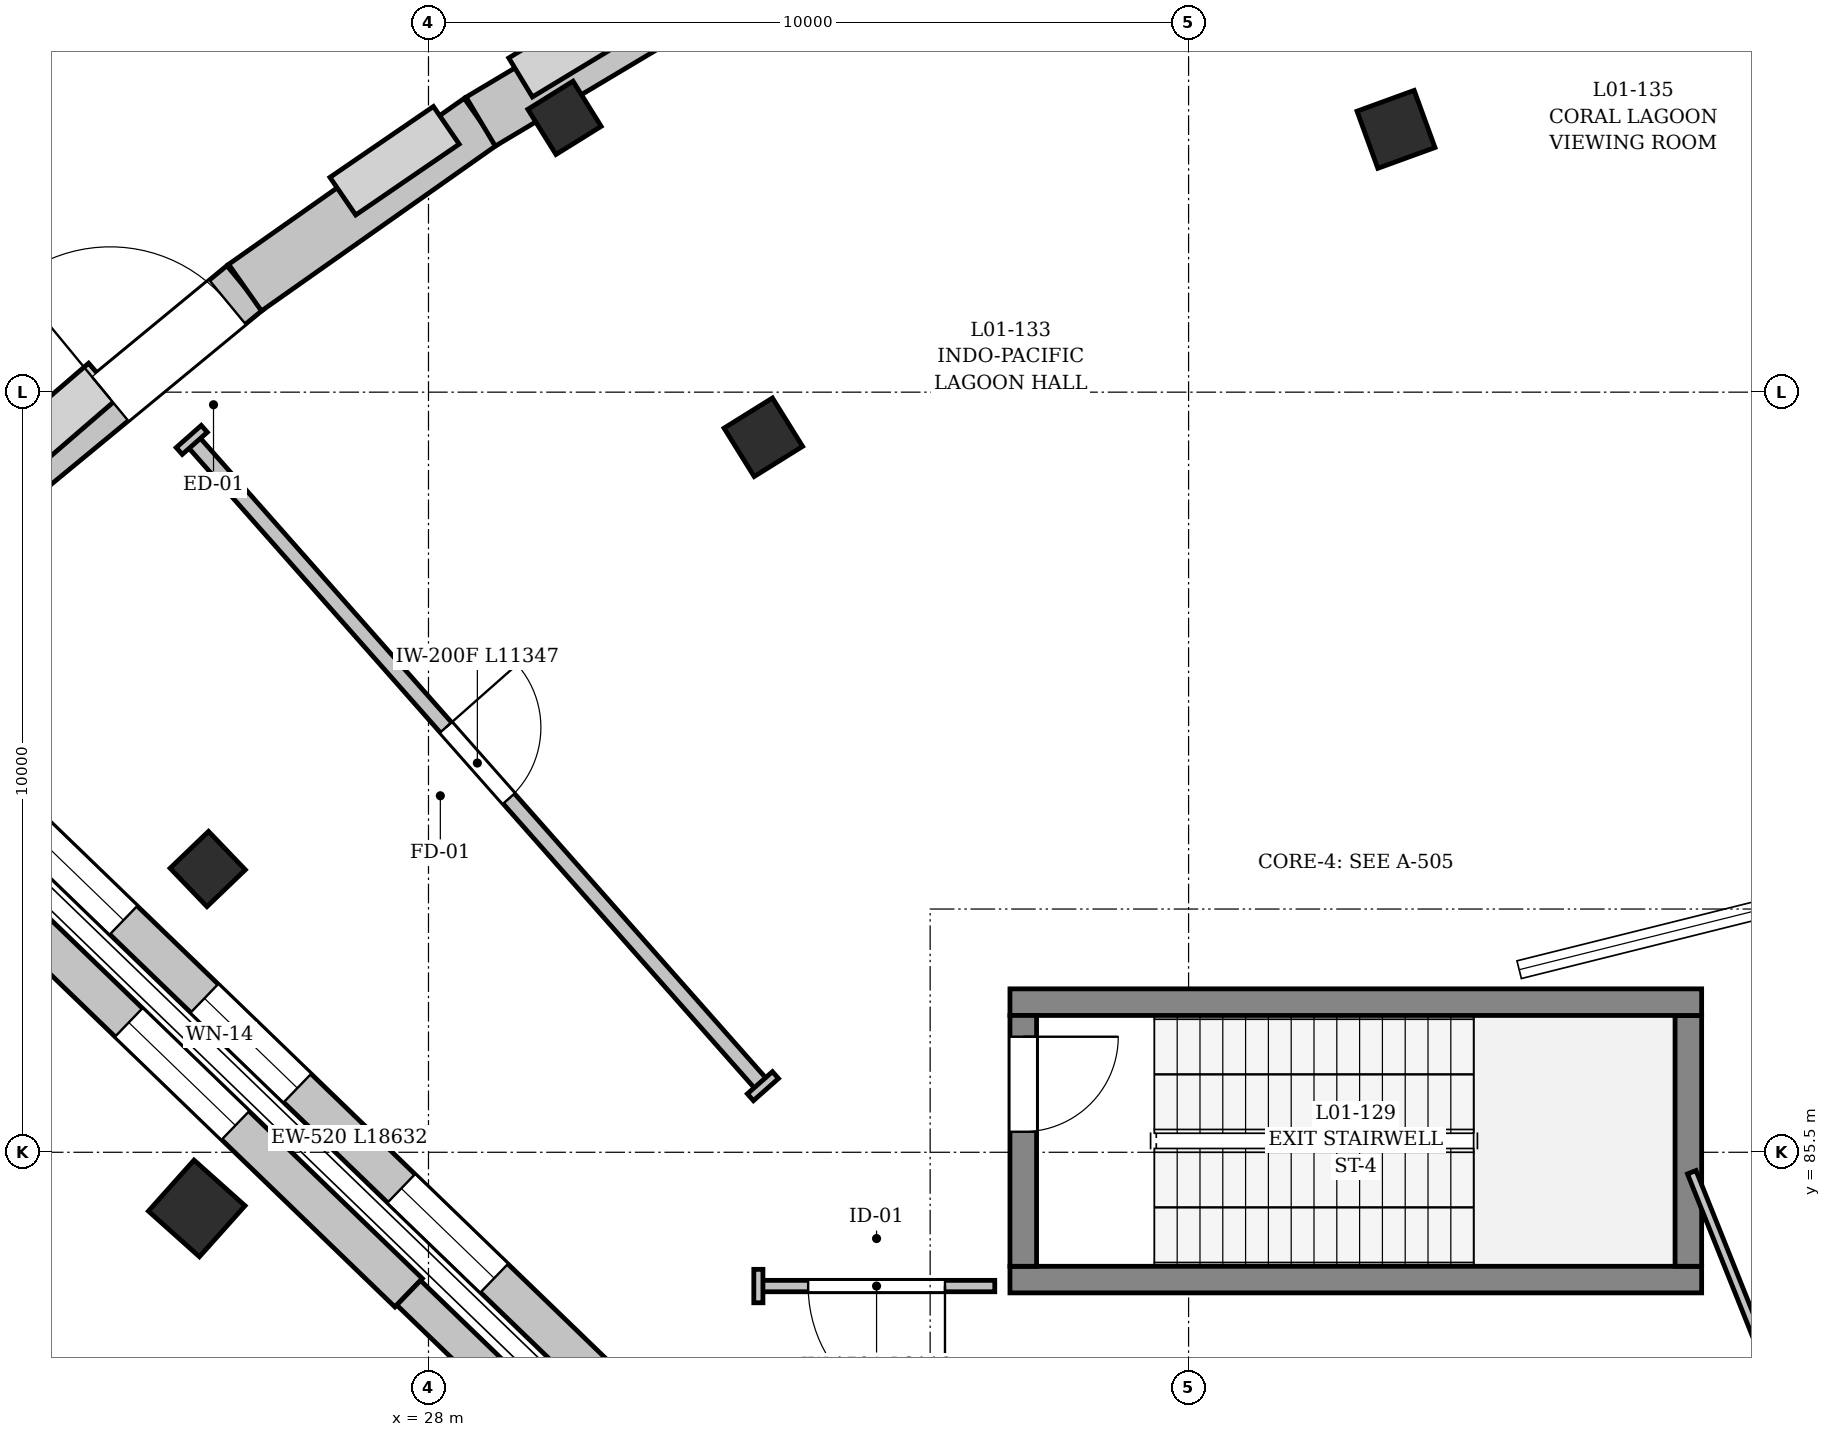
"""IFC4 building model, lengths in metres.
Left out: names, types, materials, properties, quantities, classifications, styles, units other than length and angle.
Written with IfcOpenShell. Run it as: python <this file> out.ifc"""

import sys

from ifc_helpers import new_model, si_unit, direction, frame, frame_2d, origin, origin_2d, place, context, subcontext, project, spatial, rectangle, extrude, element, fill, save


model = new_model("IFC4")
c1 = context("Model", 3, precision=1e-05, world=origin(), true_north=direction((0.0, 1.0)))
c2 = subcontext(c1, "Body", "Model", "MODEL_VIEW")
j1 = project(units=[si_unit("LENGTHUNIT", "METRE"), si_unit("PLANEANGLEUNIT", "RADIAN")], contexts=[c1])
p1 = place(None, origin())
s1 = spatial("IfcSite", under=j1, at=p1, CompositionType="ELEMENT")
p2 = place(p1, origin())
s2 = spatial("IfcBuilding", under=s1, at=p2, CompositionType="ELEMENT")
p3 = place(p2, origin())
s3 = spatial("IfcBuildingStorey", under=s2, at=p3, CompositionType="ELEMENT", Elevation=0.0)
p4 = place(p3, frame((24.951, 84.761, 0.0), z_axis=(0.0, 0.0, 1.0), x_axis=(-0.745475999683, 0.666532470249, 0.0)))
e1 = element("IfcColumn", 1, at=p4, inside=s3, PredefinedType="COLUMN", context=c2, shape_type="SweptSolid", body=[
    extrude(rectangle(XDim=0.9, YDim=0.9, at=origin_2d()), origin(), (0.0, 0.0, 1.0), 5.1),
])
p5 = place(p3, frame((40.729, 98.957, 0.0), z_axis=(0.0, 0.0, 1.0), x_axis=(-0.342020143326, 0.939692620786, 0.0)))
e2 = element("IfcColumn", 2, at=p5, inside=s3, PredefinedType="COLUMN", context=c2, shape_type="SweptSolid", body=[
    extrude(rectangle(XDim=0.8, YDim=0.8, at=origin_2d()), origin(), (0.0, 0.0, 1.0), 5.1),
])
p6 = place(p3, frame((32.405, 94.906, 0.0), z_axis=(0.0, 0.0, 1.0), x_axis=(-0.528438334722, 0.848971687629, 0.0)))
e3 = element("IfcColumn", 3, at=p6, inside=s3, PredefinedType="COLUMN", context=c2, shape_type="SweptSolid", body=[
    extrude(rectangle(XDim=0.75, YDim=0.75, at=origin_2d()), origin(), (0.0, 0.0, 1.0), 5.1),
])
for number, where, z_axis, x_axis in (
    (4, (29.79, 99.109, 0.0), (0.0, 0.0, 1.0), (-0.528, 0.849, 0.0)),
    (5, (25.096, 89.227, 0.0), (0.0, 0.0, 1.0), (-0.692, 0.722, 0.0)),
):
    element("IfcColumn", number, at=place(p3, frame(where, z_axis=z_axis, x_axis=x_axis)), inside=s3, PredefinedType="COLUMN", context=c2, shape_type="SweptSolid", body=[
        extrude(rectangle(XDim=0.7, YDim=0.7, at=origin_2d()), origin(), (0.0, 0.0, 1.0), 5.1),
    ])
p7 = place(p3, frame((21.777, 89.409, 0.0), z_axis=(0.0, 0.0, 1.0), x_axis=(0.719341564929, -0.694656543168, 0.0)))
e6 = element("IfcWall", 6, at=p7, inside=s3, PredefinedType="SOLIDWALL", context=c2, shape_type="SweptSolid", body=[
    extrude(rectangle(XDim=8.288, YDim=0.52, at=frame_2d((4.144, 0.0))), origin(), (0.0, 0.0, 1.0), 5.1),
])
p8 = place(p7, frame((3.169, 0.0, 0.9)))
e7 = element("IfcOpeningElement", 7, at=p8, cuts=e6, PredefinedType="OPENING", context=c2, shape_type="SweptSolid", body=[
    extrude(rectangle(XDim=1.95, YDim=2.0, at=frame_2d((0.975, 1.0))), frame((0.0, 0.27, 0.0), z_axis=(0.0, -1.0, 0.0), x_axis=(1.0, 0.0, 0.0)), (0.0, 0.0, 1.0), 0.54),
])
p9 = place(p3, frame((27.739, 83.652, 0.0), z_axis=(0.0, 0.0, 1.0), x_axis=(0.719337111916, -0.694661154392, 0.0)))
e8 = element("IfcWall", 8, at=p9, inside=s3, PredefinedType="SOLIDWALL", context=c2, shape_type="SweptSolid", body=[
    extrude(rectangle(XDim=10.003, YDim=0.45, at=frame_2d((5.001, 0.0))), origin(), (0.0, 0.0, 1.0), 5.1),
])
p10 = place(p9, frame((1.802, 0.0, 0.9)))
e9 = element("IfcOpeningElement", 9, at=p10, cuts=e8, PredefinedType="OPENING", context=c2, shape_type="SweptSolid", body=[
    extrude(rectangle(XDim=2.4, YDim=1.1, at=frame_2d((1.2, 0.55))), frame((0.0, 0.235, 0.0), z_axis=(0.0, -1.0, 0.0), x_axis=(1.0, 0.0, 0.0)), (0.0, 0.0, 1.0), 0.47),
])
p11 = place(p9, frame((5.802, 0.0, 0.9)))
e10 = element("IfcOpeningElement", 10, at=p11, cuts=e8, PredefinedType="OPENING", context=c2, shape_type="SweptSolid", body=[
    extrude(rectangle(XDim=2.4, YDim=1.1, at=frame_2d((1.2, 0.55))), frame((0.0, 0.235, 0.0), z_axis=(0.0, -1.0, 0.0), x_axis=(1.0, 0.0, 0.0)), (0.0, 0.0, 1.0), 0.47),
])
p12 = place(p3, frame((33.66, 79.213, 0.0), z_axis=(0.0, 0.0, 1.0), x_axis=(-0.719335980864, 0.694662325619, 0.0)))
e11 = element("IfcWall", 11, at=p12, inside=s3, PredefinedType="SOLIDWALL", context=c2, shape_type="SweptSolid", body=[
    extrude(rectangle(XDim=18.632, YDim=0.52, at=frame_2d((9.316, 0.0))), origin(), (0.0, 0.0, 1.0), 5.1),
])
p13 = place(p12, frame((3.066, 0.0, 0.9)))
e12 = element("IfcOpeningElement", 12, at=p13, cuts=e11, PredefinedType="OPENING", context=c2, shape_type="SweptSolid", body=[
    extrude(rectangle(XDim=1.7, YDim=1.55, at=frame_2d((0.85, 0.775))), frame((0.0, 0.27, 0.0), z_axis=(0.0, -1.0, 0.0), x_axis=(1.0, 0.0, 0.0)), (0.0, 0.0, 1.0), 0.54),
])
p14 = place(p12, frame((6.666, 0.0, 0.9)))
e13 = element("IfcOpeningElement", 13, at=p14, cuts=e11, PredefinedType="OPENING", context=c2, shape_type="SweptSolid", body=[
    extrude(rectangle(XDim=1.7, YDim=1.55, at=frame_2d((0.85, 0.775))), frame((0.0, 0.27, 0.0), z_axis=(0.0, -1.0, 0.0), x_axis=(1.0, 0.0, 0.0)), (0.0, 0.0, 1.0), 0.54),
])
p15 = place(p12, frame((10.266, 0.0, 0.9)))
e14 = element("IfcOpeningElement", 14, at=p15, cuts=e11, PredefinedType="OPENING", context=c2, shape_type="SweptSolid", body=[
    extrude(rectangle(XDim=1.7, YDim=1.55, at=frame_2d((0.85, 0.775))), frame((0.0, 0.27, 0.0), z_axis=(0.0, -1.0, 0.0), x_axis=(1.0, 0.0, 0.0)), (0.0, 0.0, 1.0), 0.54),
])
p16 = place(p12, frame((13.446, 0.0, 0.9)))
e15 = element("IfcOpeningElement", 15, at=p16, cuts=e11, PredefinedType="OPENING", context=c2, shape_type="SweptSolid", body=[
    extrude(rectangle(XDim=1.7, YDim=1.55, at=frame_2d((0.85, 0.775))), frame((0.0, 0.27, 0.0), z_axis=(0.0, -1.0, 0.0), x_axis=(1.0, 0.0, 0.0)), (0.0, 0.0, 1.0), 0.54),
])
p17 = place(p3, frame((22.661, 94.463, 0.0), z_axis=(0.0, 0.0, 1.0), x_axis=(0.771645805476, 0.636052474951, 0.0)))
e16 = element("IfcWall", 16, at=p17, inside=s3, PredefinedType="SOLIDWALL", context=c2, shape_type="SweptSolid", body=[
    extrude(rectangle(XDim=3.792, YDim=0.75, at=frame_2d((1.896, 0.0))), origin(), (0.0, 0.0, 1.0), 5.1),
])
p18 = place(p17, frame((1.492, 0.0, 0.0)))
e17 = element("IfcOpeningElement", 17, at=p18, cuts=e16, PredefinedType="OPENING", context=c2, shape_type="SweptSolid", body=[
    extrude(rectangle(XDim=2.0, YDim=2.5, at=frame_2d((1.0, 1.25))), frame((0.0, 0.385, 0.0), z_axis=(0.0, -1.0, 0.0), x_axis=(1.0, 0.0, 0.0)), (0.0, 0.0, 1.0), 0.77),
])
p19 = place(p3, frame((25.587, 96.875, 0.0), z_axis=(0.0, 0.0, 1.0), x_axis=(0.817470720904, 0.57597015588, 0.0)))
e18 = element("IfcWall", 18, at=p19, inside=s3, PredefinedType="SOLIDWALL", context=c2, shape_type="SweptSolid", body=[
    extrude(rectangle(XDim=3.792, YDim=0.75, at=frame_2d((1.896, 0.0))), origin(), (0.0, 0.0, 1.0), 5.1),
])
p20 = place(p3, frame((28.687, 99.059, 0.0), z_axis=(0.0, 0.0, 1.0), x_axis=(0.858644028079, 0.512572368592, 0.0)))
e19 = element("IfcWall", 19, at=p20, inside=s3, PredefinedType="SOLIDWALL", context=c2, shape_type="SweptSolid", body=[
    extrude(rectangle(XDim=3.792, YDim=0.75, at=frame_2d((1.896, 0.0))), origin(), (0.0, 0.0, 1.0), 4.09),
])
p21 = place(p3, frame((35.65, 83.825, 0.0), z_axis=(0.0, 0.0, 1.0), x_axis=(1.0, 0.0, 0.0)))
e20 = element("IfcWall", 20, at=p21, inside=s3, PredefinedType="SHEAR", context=c2, shape_type="SweptSolid", body=[
    extrude(rectangle(XDim=9.1, YDim=0.35, at=frame_2d((4.55, 0.0))), origin(), (0.0, 0.0, 1.0), 5.1),
])
p22 = place(p3, frame((44.575, 84.0, 0.0), z_axis=(0.0, 0.0, 1.0), x_axis=(0.0, 1.0, 0.0)))
e21 = element("IfcWall", 21, at=p22, inside=s3, PredefinedType="SHEAR", context=c2, shape_type="SweptSolid", body=[
    extrude(rectangle(XDim=3.3, YDim=0.35, at=frame_2d((1.65, 0.0))), origin(), (0.0, 0.0, 1.0), 5.1),
])
p23 = place(p3, frame((44.75, 87.475, 0.0), z_axis=(0.0, 0.0, 1.0), x_axis=(-1.0, 0.0, 0.0)))
e22 = element("IfcWall", 22, at=p23, inside=s3, PredefinedType="SHEAR", context=c2, shape_type="SweptSolid", body=[
    extrude(rectangle(XDim=9.1, YDim=0.35, at=frame_2d((4.55, 0.0))), origin(), (0.0, 0.0, 1.0), 5.1),
])
p24 = place(p3, frame((35.825, 87.3, 0.0), z_axis=(0.0, 0.0, 1.0), x_axis=(0.0, -1.0, 0.0)))
e23 = element("IfcWall", 23, at=p24, inside=s3, PredefinedType="SHEAR", context=c2, shape_type="SweptSolid", body=[
    extrude(rectangle(XDim=3.3, YDim=0.35, at=frame_2d((1.65, 0.0))), origin(), (0.0, 0.0, 1.0), 5.1),
])
p25 = place(p24, frame((0.28, 0.0, 0.0)))
e24 = element("IfcOpeningElement", 24, at=p25, cuts=e23, PredefinedType="OPENING", context=c2, shape_type="SweptSolid", body=[
    extrude(rectangle(XDim=1.25, YDim=2.2, at=frame_2d((0.625, 1.1))), frame((0.0, 0.185, 0.0), z_axis=(0.0, -1.0, 0.0), x_axis=(1.0, 0.0, 0.0)), (0.0, 0.0, 1.0), 0.37),
])
p26 = place(p3, frame((24.886, 94.872, 0.0), z_axis=(0.0, 0.0, 1.0), x_axis=(0.66223769238, -0.749293826741, 0.0)))
e25 = element("IfcWall", 25, at=p26, inside=s3, PredefinedType="PARTITIONING", context=c2, shape_type="SweptSolid", body=[
    extrude(rectangle(XDim=11.347, YDim=0.2, at=frame_2d((5.673, 0.0))), origin(), (0.0, 0.0, 1.0), 4.41),
])
p27 = place(p26, frame((5.048, 0.0, 0.0)))
e26 = element("IfcOpeningElement", 26, at=p27, cuts=e25, PredefinedType="OPENING", context=c2, shape_type="SweptSolid", body=[
    extrude(rectangle(XDim=1.25, YDim=2.2, at=frame_2d((0.625, 1.1))), frame((0.0, 0.11, 0.0), z_axis=(0.0, -1.0, 0.0), x_axis=(1.0, 0.0, 0.0)), (0.0, 0.0, 1.0), 0.22),
])
p28 = place(p3, frame((35.45, 83.74, 0.0), z_axis=(0.0, 0.0, 1.0), x_axis=(-1.0, 0.0, 0.0)))
e27 = element("IfcWall", 27, at=p28, inside=s3, PredefinedType="PARTITIONING", context=c2, shape_type="SweptSolid", body=[
    extrude(rectangle(XDim=3.11, YDim=0.15, at=frame_2d((1.555, 0.0))), origin(), (0.0, 0.0, 1.0), 4.49),
])
p29 = place(p28, frame((0.655, 0.0, 0.0)))
e28 = element("IfcOpeningElement", 28, at=p29, cuts=e27, PredefinedType="OPENING", context=c2, shape_type="SweptSolid", body=[
    extrude(rectangle(XDim=1.8, YDim=2.4, at=frame_2d((0.9, 1.2))), frame((0.0, 0.085, 0.0), z_axis=(0.0, -1.0, 0.0), x_axis=(1.0, 0.0, 0.0)), (0.0, 0.0, 1.0), 0.17),
])
p30 = place(p3, frame((47.568, 77.865, 0.0), z_axis=(0.0, 0.0, 1.0), x_axis=(-0.371358869186, 0.928489413121, 0.0)))
e29 = element("IfcWall", 29, at=p30, inside=s3, PredefinedType="PARTITIONING", context=c2, shape_type="SweptSolid", body=[
    extrude(rectangle(XDim=7.94, YDim=0.12, at=frame_2d((3.97, 0.0))), origin(), (0.0, 0.0, 1.0), 4.39),
])
p31 = place(p30, frame((3.05, 0.0, 0.0)))
e30 = element("IfcOpeningElement", 30, at=p31, cuts=e29, PredefinedType="OPENING", context=c2, shape_type="SweptSolid", body=[
    extrude(rectangle(XDim=0.95, YDim=2.2, at=frame_2d((0.475, 1.1))), frame((0.0, 0.07, 0.0), z_axis=(0.0, -1.0, 0.0), x_axis=(1.0, 0.0, 0.0)), (0.0, 0.0, 1.0), 0.14),
])
for number, where, z_axis, x_axis in (
    (31, (24.721, 94.726, 0.0), (0.0, 0.0, 1.0), (0.749, 0.662, 0.0)),
    (32, (32.235, 86.224, 0.0), (0.0, 0.0, 1.0), (0.749, 0.662, 0.0)),
):
    element("IfcWall", number, at=place(p3, frame(where, z_axis=z_axis, x_axis=x_axis)), inside=s3, PredefinedType="PARTITIONING", context=c2, shape_type="SweptSolid", body=[
        extrude(rectangle(XDim=0.44, YDim=0.12, at=frame_2d((0.22, 0.0))), origin(), (0.0, 0.0, 1.0), 5.1),
    ])
p32 = place(p3, frame((32.34, 83.96, 0.0), z_axis=(0.0, 0.0, 1.0), x_axis=(0.0, -1.0, 0.0)))
e33 = element("IfcWall", 33, at=p32, inside=s3, PredefinedType="PARTITIONING", context=c2, shape_type="SweptSolid", body=[
    extrude(rectangle(XDim=0.44, YDim=0.12, at=frame_2d((0.22, 0.0))), origin(), (0.0, 0.0, 1.0), 4.49),
])
p33 = place(p8, origin())
e34 = element("IfcWindow", 34, at=p33, inside=s3, PartitioningType="DOUBLE_PANEL_VERTICAL", PredefinedType="WINDOW", context=c2, shape_type="SweptSolid", body=[
    extrude(rectangle(XDim=1.95, YDim=2.0, at=frame_2d((0.975, 1.0))), frame((0.0, 0.03, 0.0), z_axis=(0.0, -1.0, 0.0), x_axis=(1.0, 0.0, 0.0)), (0.0, 0.0, 1.0), 0.06),
])
fill(e7, e34)
p34 = place(p14, origin())
e35 = element("IfcWindow", 35, at=p34, inside=s3, PartitioningType="DOUBLE_PANEL_VERTICAL", PredefinedType="WINDOW", context=c2, shape_type="SweptSolid", body=[
    extrude(rectangle(XDim=1.7, YDim=1.55, at=frame_2d((0.85, 0.775))), frame((0.0, 0.03, 0.0), z_axis=(0.0, -1.0, 0.0), x_axis=(1.0, 0.0, 0.0)), (0.0, 0.0, 1.0), 0.06),
])
fill(e13, e35)
p35 = place(p15, origin())
e36 = element("IfcWindow", 36, at=p35, inside=s3, PartitioningType="DOUBLE_PANEL_VERTICAL", PredefinedType="WINDOW", context=c2, shape_type="SweptSolid", body=[
    extrude(rectangle(XDim=1.7, YDim=1.55, at=frame_2d((0.85, 0.775))), frame((0.0, 0.03, 0.0), z_axis=(0.0, -1.0, 0.0), x_axis=(1.0, 0.0, 0.0)), (0.0, 0.0, 1.0), 0.06),
])
fill(e14, e36)
p36 = place(p16, origin())
e37 = element("IfcWindow", 37, at=p36, inside=s3, PartitioningType="DOUBLE_PANEL_VERTICAL", PredefinedType="WINDOW", context=c2, shape_type="SweptSolid", body=[
    extrude(rectangle(XDim=1.7, YDim=1.55, at=frame_2d((0.85, 0.775))), frame((0.0, 0.03, 0.0), z_axis=(0.0, -1.0, 0.0), x_axis=(1.0, 0.0, 0.0)), (0.0, 0.0, 1.0), 0.06),
])
fill(e15, e37)
p37 = place(p18, origin())
e38 = element("IfcDoor", 38, at=p37, inside=s3, OperationType="DOUBLE_DOOR_SINGLE_SWING", PredefinedType="DOOR", context=c2, shape_type="SweptSolid", body=[
    extrude(rectangle(XDim=2.0, YDim=2.5, at=frame_2d((1.0, 1.25))), frame((0.0, 0.025, 0.0), z_axis=(0.0, -1.0, 0.0), x_axis=(1.0, 0.0, 0.0)), (0.0, 0.0, 1.0), 0.05),
])
fill(e17, e38)
p38 = place(p25, origin())
e39 = element("IfcDoor", 39, at=p38, inside=s3, OperationType="SINGLE_SWING_RIGHT", PredefinedType="DOOR", context=c2, shape_type="SweptSolid", body=[
    extrude(rectangle(XDim=1.25, YDim=2.2, at=frame_2d((0.625, 1.1))), frame((0.0, 0.025, 0.0), z_axis=(0.0, -1.0, 0.0), x_axis=(1.0, 0.0, 0.0)), (0.0, 0.0, 1.0), 0.05),
])
fill(e24, e39)
p39 = place(p27, origin())
e40 = element("IfcDoor", 40, at=p39, inside=s3, OperationType="SINGLE_SWING_LEFT", PredefinedType="DOOR", context=c2, shape_type="SweptSolid", body=[
    extrude(rectangle(XDim=1.25, YDim=2.2, at=frame_2d((0.625, 1.1))), frame((0.0, 0.025, 0.0), z_axis=(0.0, -1.0, 0.0), x_axis=(1.0, 0.0, 0.0)), (0.0, 0.0, 1.0), 0.05),
])
fill(e26, e40)
p40 = place(p29, origin())
e41 = element("IfcDoor", 41, at=p40, inside=s3, OperationType="DOUBLE_DOOR_SINGLE_SWING", PredefinedType="DOOR", context=c2, shape_type="SweptSolid", body=[
    extrude(rectangle(XDim=1.8, YDim=2.4, at=frame_2d((0.9, 1.2))), frame((0.0, 0.025, 0.0), z_axis=(0.0, -1.0, 0.0), x_axis=(1.0, 0.0, 0.0)), (0.0, 0.0, 1.0), 0.05),
])
fill(e28, e41)
save(model, sys.argv[1])
